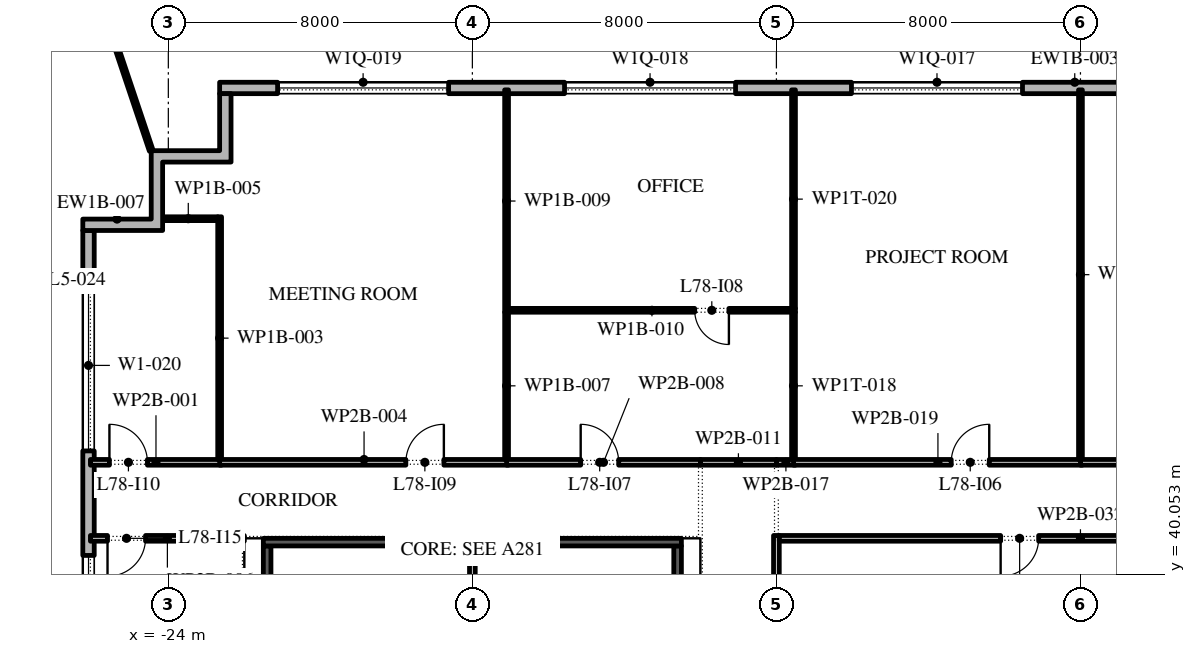
"""IFC4 building model, lengths in metres.
Left out: names, types, materials, properties, quantities, classifications, styles, units other than length and angle.
Written with IfcOpenShell. Run it as: python <this file> out.ifc"""

import sys

from ifc_helpers import new_model, si_unit, direction, frame, frame_2d, origin, place, context, subcontext, project, spatial, polyline, rectangle, outline, extrude, element, fill, save


model = new_model("IFC4")
c1 = context("Model", 3, precision=1e-05, world=origin(), true_north=direction((0.0, 1.0)))
c2 = subcontext(c1, "Body", "Model", "MODEL_VIEW")
j1 = project(units=[si_unit("LENGTHUNIT", "METRE"), si_unit("PLANEANGLEUNIT", "RADIAN")], contexts=[c1])
p1 = place(None, origin())
s1 = spatial("IfcSite", under=j1, at=p1, CompositionType="ELEMENT")
p2 = place(p1, origin())
s2 = spatial("IfcBuilding", under=s1, at=p2, CompositionType="ELEMENT")
p3 = place(p2, frame((0.0, 0.0, 355.2)))
s3 = spatial("IfcBuildingStorey", under=s2, at=p3, CompositionType="ELEMENT", Elevation=355.2)
p4 = place(p3, frame((22.35, 52.85, 0.0), z_axis=(0.0, 0.0, 1.0), x_axis=(-1.0, 0.0, 0.0)))
e1 = element("IfcWall", 1, at=p4, inside=s3, PredefinedType="STANDARD", context=c2, shape_type="SweptSolid", body=[
    extrude(rectangle(XDim=45.0, YDim=0.3, at=frame_2d((22.5, 0.0))), origin(), (0.0, 0.0, 1.0), 3.95),
])
p5 = place(p4, frame((1.375, 0.0, 0.45)))
e2 = element("IfcOpeningElement", 2, at=p5, cuts=e1, PredefinedType="OPENING", context=c2, shape_type="SweptSolid", body=[
    extrude(rectangle(XDim=4.5, YDim=2.45, at=frame_2d((2.25, 1.225))), frame((0.0, 0.16, 0.0), z_axis=(0.0, -1.0, 0.0), x_axis=(1.0, 0.0, 0.0)), (0.0, 0.0, 1.0), 0.32),
])
p6 = place(p4, frame((8.775, 0.0, 0.45)))
e3 = element("IfcOpeningElement", 3, at=p6, cuts=e1, PredefinedType="OPENING", context=c2, shape_type="SweptSolid", body=[
    extrude(rectangle(XDim=4.5, YDim=2.45, at=frame_2d((2.25, 1.225))), frame((0.0, 0.16, 0.0), z_axis=(0.0, -1.0, 0.0), x_axis=(1.0, 0.0, 0.0)), (0.0, 0.0, 1.0), 0.32),
])
p7 = place(p4, frame((17.375, 0.0, 0.0)))
e4 = element("IfcOpeningElement", 4, at=p7, cuts=e1, PredefinedType="OPENING", context=c2, shape_type="SweptSolid", body=[
    extrude(rectangle(XDim=2.4, YDim=2.9, at=frame_2d((1.2, 1.45))), frame((0.0, 0.16, 0.0), z_axis=(0.0, -1.0, 0.0), x_axis=(1.0, 0.0, 0.0)), (0.0, 0.0, 1.0), 0.32),
])
p8 = place(p4, frame((23.875, 0.0, 0.45)))
e5 = element("IfcOpeningElement", 5, at=p8, cuts=e1, PredefinedType="OPENING", context=c2, shape_type="SweptSolid", body=[
    extrude(rectangle(XDim=4.5, YDim=2.45, at=frame_2d((2.25, 1.225))), frame((0.0, 0.16, 0.0), z_axis=(0.0, -1.0, 0.0), x_axis=(1.0, 0.0, 0.0)), (0.0, 0.0, 1.0), 0.32),
])
p9 = place(p4, frame((31.425, 0.0, 0.45)))
e6 = element("IfcOpeningElement", 6, at=p9, cuts=e1, PredefinedType="OPENING", context=c2, shape_type="SweptSolid", body=[
    extrude(rectangle(XDim=4.5, YDim=2.45, at=frame_2d((2.25, 1.225))), frame((0.0, 0.16, 0.0), z_axis=(0.0, -1.0, 0.0), x_axis=(1.0, 0.0, 0.0)), (0.0, 0.0, 1.0), 0.32),
])
p10 = place(p4, frame((38.975, 0.0, 0.45)))
e7 = element("IfcOpeningElement", 7, at=p10, cuts=e1, PredefinedType="OPENING", context=c2, shape_type="SweptSolid", body=[
    extrude(rectangle(XDim=4.5, YDim=2.45, at=frame_2d((2.25, 1.225))), frame((0.0, 0.16, 0.0), z_axis=(0.0, -1.0, 0.0), x_axis=(1.0, 0.0, 0.0)), (0.0, 0.0, 1.0), 0.32),
])
p11 = place(p3, frame((-26.1, 49.1, 0.0), z_axis=(0.0, 0.0, 1.0), x_axis=(0.0, -1.0, 0.0)))
e8 = element("IfcWall", 8, at=p11, inside=s3, PredefinedType="STANDARD", context=c2, shape_type="SweptSolid", body=[
    extrude(rectangle(XDim=51.5, YDim=0.3, at=frame_2d((25.75, 0.0))), origin(), (0.0, 0.0, 1.0), 3.95),
])
p12 = place(p11, frame((1.3, 0.0, 0.45)))
e9 = element("IfcOpeningElement", 9, at=p12, cuts=e8, PredefinedType="OPENING", context=c2, shape_type="SweptSolid", body=[
    extrude(rectangle(XDim=4.5, YDim=3.05, at=frame_2d((2.25, 1.525))), frame((0.0, 0.16, 0.0), z_axis=(0.0, -1.0, 0.0), x_axis=(1.0, 0.0, 0.0)), (0.0, 0.0, 1.0), 0.32),
])
p13 = place(p11, frame((8.55, 0.0, 0.45)))
e10 = element("IfcOpeningElement", 10, at=p13, cuts=e8, PredefinedType="OPENING", context=c2, shape_type="SweptSolid", body=[
    extrude(rectangle(XDim=4.5, YDim=3.05, at=frame_2d((2.25, 1.525))), frame((0.0, 0.16, 0.0), z_axis=(0.0, -1.0, 0.0), x_axis=(1.0, 0.0, 0.0)), (0.0, 0.0, 1.0), 0.32),
])
p14 = place(p11, frame((17.0, 0.0, 0.0)))
e11 = element("IfcOpeningElement", 11, at=p14, cuts=e8, PredefinedType="OPENING", context=c2, shape_type="SweptSolid", body=[
    extrude(rectangle(XDim=2.4, YDim=3.45, at=frame_2d((1.2, 1.725))), frame((0.0, 0.16, 0.0), z_axis=(0.0, -1.0, 0.0), x_axis=(1.0, 0.0, 0.0)), (0.0, 0.0, 1.0), 0.32),
])
p15 = place(p11, frame((23.35, 0.0, 0.45)))
e12 = element("IfcOpeningElement", 12, at=p15, cuts=e8, PredefinedType="OPENING", context=c2, shape_type="SweptSolid", body=[
    extrude(rectangle(XDim=4.5, YDim=3.05, at=frame_2d((2.25, 1.525))), frame((0.0, 0.16, 0.0), z_axis=(0.0, -1.0, 0.0), x_axis=(1.0, 0.0, 0.0)), (0.0, 0.0, 1.0), 0.32),
])
p16 = place(p11, frame((30.75, 0.0, 0.45)))
e13 = element("IfcOpeningElement", 13, at=p16, cuts=e8, PredefinedType="OPENING", context=c2, shape_type="SweptSolid", body=[
    extrude(rectangle(XDim=4.5, YDim=3.05, at=frame_2d((2.25, 1.525))), frame((0.0, 0.16, 0.0), z_axis=(0.0, -1.0, 0.0), x_axis=(1.0, 0.0, 0.0)), (0.0, 0.0, 1.0), 0.32),
])
p17 = place(p11, frame((38.15, 0.0, 0.45)))
e14 = element("IfcOpeningElement", 14, at=p17, cuts=e8, PredefinedType="OPENING", context=c2, shape_type="SweptSolid", body=[
    extrude(rectangle(XDim=4.5, YDim=3.0, at=frame_2d((2.25, 1.5))), frame((0.0, 0.16, 0.0), z_axis=(0.0, -1.0, 0.0), x_axis=(1.0, 0.0, 0.0)), (0.0, 0.0, 1.0), 0.32),
])
p18 = place(p11, frame((46.6, 0.0, 0.0)))
e15 = element("IfcOpeningElement", 15, at=p18, cuts=e8, PredefinedType="OPENING", context=c2, shape_type="SweptSolid", body=[
    extrude(rectangle(XDim=2.4, YDim=3.45, at=frame_2d((1.2, 1.725))), frame((0.0, 0.16, 0.0), z_axis=(0.0, -1.0, 0.0), x_axis=(1.0, 0.0, 0.0)), (0.0, 0.0, 1.0), 0.32),
])
p19 = place(p3, origin())
e16 = element("IfcWall", 16, at=p19, inside=s3, PredefinedType="STANDARD", context=c2, shape_type="SweptSolid", body=[
    extrude(outline(polyline([(-24.45, 49.4), (-24.45, 51.2), (-22.65, 51.2), (-22.65, 52.7), (-22.35, 52.7), (-22.35, 50.9), (-24.15, 50.9), (-24.15, 49.1), (-26.25, 49.1), (-26.25, 49.4), (-24.45, 49.4)])), origin(), (0.0, 0.0, 1.0), 3.95),
])
p20 = place(p3, frame((-24.45, 51.2, -0.05), z_axis=(0.0, 0.0, 1.0), x_axis=(-0.318388488285, 0.947960321178, 0.0)))
e17 = element("IfcWall", 17, at=p20, inside=s3, PredefinedType="STANDARD", context=c2, shape_type="SweptSolid", body=[
    extrude(rectangle(XDim=6.811, YDim=0.1, at=frame_2d((3.405, 0.0))), origin(), (0.0, 0.0, 1.0), 4.0),
])
p21 = place(p3, frame((-21.4, 25.75, 0.0), z_axis=(0.0, 0.0, 1.0), x_axis=(0.0, 1.0, 0.0)))
e18 = element("IfcWall", 18, at=p21, inside=s3, PredefinedType="SHEAR", context=c2, shape_type="SweptSolid", body=[
    extrude(rectangle(XDim=15.05, YDim=0.2, at=frame_2d((7.525, 0.0))), origin(), (0.0, 0.0, 1.0), 3.95),
])
p22 = place(p21, frame((7.075, 0.0, 0.0)))
e19 = element("IfcOpeningElement", 19, at=p22, cuts=e18, PredefinedType="OPENING", context=c2, shape_type="SweptSolid", body=[
    extrude(rectangle(XDim=0.9, YDim=2.1, at=frame_2d((0.45, 1.05))), frame((0.0, 0.11, 0.0), z_axis=(0.0, -1.0, 0.0), x_axis=(1.0, 0.0, 0.0)), (0.0, 0.0, 1.0), 0.22),
])
p23 = place(p3, frame((-10.6, 25.75, 0.0), z_axis=(0.0, 0.0, 1.0), x_axis=(0.0, 1.0, 0.0)))
e20 = element("IfcWall", 20, at=p23, inside=s3, PredefinedType="SHEAR", context=c2, shape_type="SweptSolid", body=[
    extrude(rectangle(XDim=15.05, YDim=0.2, at=frame_2d((7.525, 0.0))), origin(), (0.0, 0.0, 1.0), 3.95),
])
p24 = place(p23, frame((3.288, 0.0, 0.0)))
e21 = element("IfcOpeningElement", 21, at=p24, cuts=e20, PredefinedType="OPENING", context=c2, shape_type="SweptSolid", body=[
    extrude(rectangle(XDim=0.9, YDim=2.1, at=frame_2d((0.45, 1.05))), frame((0.0, 0.11, 0.0), z_axis=(0.0, -1.0, 0.0), x_axis=(1.0, 0.0, 0.0)), (0.0, 0.0, 1.0), 0.22),
])
p25 = place(p23, frame((10.887, 0.0, 0.0)))
e22 = element("IfcOpeningElement", 22, at=p25, cuts=e20, PredefinedType="OPENING", context=c2, shape_type="SweptSolid", body=[
    extrude(rectangle(XDim=0.9, YDim=2.1, at=frame_2d((0.45, 1.05))), frame((0.0, 0.11, 0.0), z_axis=(0.0, -1.0, 0.0), x_axis=(1.0, 0.0, 0.0)), (0.0, 0.0, 1.0), 0.22),
])
p26 = place(p3, frame((-21.5, 40.9, 0.0), z_axis=(0.0, 0.0, 1.0), x_axis=(1.0, 0.0, 0.0)))
e23 = element("IfcWall", 23, at=p26, inside=s3, PredefinedType="SHEAR", context=c2, shape_type="SweptSolid", body=[
    extrude(rectangle(XDim=11.0, YDim=0.2, at=frame_2d((5.5, 0.0))), origin(), (0.0, 0.0, 1.0), 3.95),
])
p27 = place(p3, frame((-16.0, 25.75, 0.0), z_axis=(0.0, 0.0, 1.0), x_axis=(0.0, 1.0, 0.0)))
e24 = element("IfcWall", 24, at=p27, inside=s3, PredefinedType="PARTITIONING", context=c2, shape_type="SweptSolid", body=[
    extrude(rectangle(XDim=15.05, YDim=0.15, at=frame_2d((7.525, 0.0))), origin(), (0.0, 0.0, 1.0), 3.95),
])
p28 = place(p3, frame((-26.05, 43.0, 0.0), z_axis=(0.0, 0.0, 1.0), x_axis=(1.0, 0.0, 0.0)))
e25 = element("IfcWall", 25, at=p28, inside=s3, PredefinedType="PARTITIONING", context=c2, shape_type="SweptSolid", body=[
    extrude(rectangle(XDim=3.45, YDim=0.15, at=frame_2d((1.725, 0.0))), origin(), (0.0, 0.0, 1.0), 3.95),
])
p29 = place(p28, frame((0.5, 0.0, 0.0)))
e26 = element("IfcOpeningElement", 26, at=p29, cuts=e25, PredefinedType="OPENING", context=c2, shape_type="SweptSolid", body=[
    extrude(rectangle(XDim=1.0, YDim=2.1, at=frame_2d((0.5, 1.05))), frame((0.0, 0.085, 0.0), z_axis=(0.0, -1.0, 0.0), x_axis=(1.0, 0.0, 0.0)), (0.0, 0.0, 1.0), 0.17),
])
p30 = place(p3, frame((-22.65, 43.075, 0.0), z_axis=(0.0, 0.0, 1.0), x_axis=(0.0, 1.0, 0.0)))
e27 = element("IfcWall", 27, at=p30, inside=s3, PredefinedType="PARTITIONING", context=c2, shape_type="SweptSolid", body=[
    extrude(rectangle(XDim=6.385, YDim=0.1, at=frame_2d((3.192, 0.0))), origin(), (0.0, 0.0, 1.0), 3.95),
])
p31 = place(p3, frame((-22.65, 43.0, 0.0), z_axis=(0.0, 0.0, 1.0), x_axis=(1.0, 0.0, 0.0)))
e28 = element("IfcWall", 28, at=p31, inside=s3, PredefinedType="PARTITIONING", context=c2, shape_type="SweptSolid", body=[
    extrude(rectangle(XDim=7.6, YDim=0.15, at=frame_2d((3.8, 0.0))), origin(), (0.0, 0.0, 1.0), 3.95),
])
p32 = place(p31, frame((4.9, 0.0, 0.0)))
e29 = element("IfcOpeningElement", 29, at=p32, cuts=e28, PredefinedType="OPENING", context=c2, shape_type="SweptSolid", body=[
    extrude(rectangle(XDim=1.0, YDim=2.1, at=frame_2d((0.5, 1.05))), frame((0.0, 0.085, 0.0), z_axis=(0.0, -1.0, 0.0), x_axis=(1.0, 0.0, 0.0)), (0.0, 0.0, 1.0), 0.17),
])
p33 = place(p3, frame((-22.7, 49.41, 0.0), z_axis=(0.0, 0.0, 1.0), x_axis=(-1.0, 0.0, 0.0)))
e30 = element("IfcWall", 30, at=p33, inside=s3, PredefinedType="PARTITIONING", context=c2, shape_type="SweptSolid", body=[
    extrude(rectangle(XDim=1.55, YDim=0.1, at=frame_2d((0.775, 0.0))), origin(), (0.0, 0.0, 1.0), 3.95),
])
p34 = place(p3, frame((-22.0, 41.0, 0.0), z_axis=(0.0, 0.0, 1.0), x_axis=(-1.0, 0.0, 0.0)))
e31 = element("IfcWall", 31, at=p34, inside=s3, PredefinedType="PARTITIONING", context=c2, shape_type="SweptSolid", body=[
    extrude(rectangle(XDim=4.05, YDim=0.15, at=frame_2d((2.025, 0.0))), origin(), (0.0, 0.0, 1.0), 3.95),
])
p35 = place(p34, frame((2.6, 0.0, 0.0)))
e32 = element("IfcOpeningElement", 32, at=p35, cuts=e31, PredefinedType="OPENING", context=c2, shape_type="SweptSolid", body=[
    extrude(rectangle(XDim=1.0, YDim=2.1, at=frame_2d((0.5, 1.05))), frame((0.0, 0.085, 0.0), z_axis=(0.0, -1.0, 0.0), x_axis=(1.0, 0.0, 0.0)), (0.0, 0.0, 1.0), 0.17),
])
p36 = place(p3, frame((-15.1, 43.075, 0.0), z_axis=(0.0, 0.0, 1.0), x_axis=(0.0, 1.0, 0.0)))
e33 = element("IfcWall", 33, at=p36, inside=s3, PredefinedType="PARTITIONING", context=c2, shape_type="SweptSolid", body=[
    extrude(rectangle(XDim=3.875, YDim=0.1, at=frame_2d((1.938, 0.0))), origin(), (0.0, 0.0, 1.0), 3.95),
])
p37 = place(p3, frame((-15.1, 43.0, 0.0), z_axis=(0.0, 0.0, 1.0), x_axis=(1.0, 0.0, 0.0)))
e34 = element("IfcWall", 34, at=p37, inside=s3, PredefinedType="PARTITIONING", context=c2, shape_type="SweptSolid", body=[
    extrude(rectangle(XDim=5.1, YDim=0.15, at=frame_2d((2.55, 0.0))), origin(), (0.0, 0.0, 1.0), 3.95),
])
p38 = place(p37, frame((1.95, 0.0, 0.0)))
e35 = element("IfcOpeningElement", 35, at=p38, cuts=e34, PredefinedType="OPENING", context=c2, shape_type="SweptSolid", body=[
    extrude(rectangle(XDim=1.0, YDim=2.1, at=frame_2d((0.5, 1.05))), frame((0.0, 0.085, 0.0), z_axis=(0.0, -1.0, 0.0), x_axis=(1.0, 0.0, 0.0)), (0.0, 0.0, 1.0), 0.17),
])
p39 = place(p3, frame((-15.1, 46.95, 0.0), z_axis=(0.0, 0.0, 1.0), x_axis=(0.0, 1.0, 0.0)))
e36 = element("IfcWall", 36, at=p39, inside=s3, PredefinedType="PARTITIONING", context=c2, shape_type="SweptSolid", body=[
    extrude(rectangle(XDim=5.85, YDim=0.1, at=frame_2d((2.925, 0.0))), origin(), (0.0, 0.0, 1.0), 3.95),
])
p40 = place(p3, frame((-15.05, 47.0, 0.0), z_axis=(0.0, 0.0, 1.0), x_axis=(1.0, 0.0, 0.0)))
e37 = element("IfcWall", 37, at=p40, inside=s3, PredefinedType="PARTITIONING", context=c2, shape_type="SweptSolid", body=[
    extrude(rectangle(XDim=7.55, YDim=0.1, at=frame_2d((3.775, 0.0))), origin(), (0.0, 0.0, 1.0), 3.95),
])
p41 = place(p40, frame((4.9, 0.0, 0.0)))
e38 = element("IfcOpeningElement", 38, at=p41, cuts=e37, PredefinedType="OPENING", context=c2, shape_type="SweptSolid", body=[
    extrude(rectangle(XDim=0.9, YDim=2.1, at=frame_2d((0.45, 1.05))), frame((0.0, 0.06, 0.0), z_axis=(0.0, -1.0, 0.0), x_axis=(1.0, 0.0, 0.0)), (0.0, 0.0, 1.0), 0.12),
])
p42 = place(p3, frame((-10.0, 43.0, 0.0), z_axis=(0.0, 0.0, 1.0), x_axis=(1.0, 0.0, 0.0)))
e39 = element("IfcWall", 39, at=p42, inside=s3, PredefinedType="PARTITIONING", context=c2, shape_type="SweptSolid", body=[
    extrude(rectangle(XDim=2.0, YDim=0.15, at=frame_2d((1.0, 0.0))), origin(), (0.0, 0.0, 1.0), 3.95),
])
p43 = place(p3, frame((-8.0, 41.075, 0.0), z_axis=(0.0, 0.0, 1.0), x_axis=(0.0, -1.0, 0.0)))
e40 = element("IfcWall", 40, at=p43, inside=s3, PredefinedType="PARTITIONING", context=c2, shape_type="SweptSolid", body=[
    extrude(rectangle(XDim=6.475, YDim=0.15, at=frame_2d((3.237, 0.0))), origin(), (0.0, 0.0, 1.0), 3.95),
])
p44 = place(p3, frame((-8.0, 43.0, 0.0), z_axis=(0.0, 0.0, 1.0), x_axis=(1.0, 0.0, 0.0)))
e41 = element("IfcWall", 41, at=p44, inside=s3, PredefinedType="PARTITIONING", context=c2, shape_type="SweptSolid", body=[
    extrude(rectangle(XDim=0.5, YDim=0.15, at=frame_2d((0.25, 0.0))), origin(), (0.0, 0.0, 1.0), 3.95),
])
p45 = place(p3, frame((-7.55, 43.075, 0.0), z_axis=(0.0, 0.0, 1.0), x_axis=(0.0, 1.0, 0.0)))
e42 = element("IfcWall", 42, at=p45, inside=s3, PredefinedType="PARTITIONING", context=c2, shape_type="SweptSolid", body=[
    extrude(rectangle(XDim=3.875, YDim=0.1, at=frame_2d((1.938, 0.0))), origin(), (0.0, 0.0, 1.0), 3.031),
])
p46 = place(p3, frame((-7.55, 43.0, 0.0), z_axis=(0.0, 0.0, 1.0), x_axis=(1.0, 0.0, 0.0)))
e43 = element("IfcWall", 43, at=p46, inside=s3, PredefinedType="PARTITIONING", context=c2, shape_type="SweptSolid", body=[
    extrude(rectangle(XDim=7.6, YDim=0.15, at=frame_2d((3.8, 0.0))), origin(), (0.0, 0.0, 1.0), 3.95),
])
p47 = place(p46, frame((4.15, 0.0, 0.0)))
e44 = element("IfcOpeningElement", 44, at=p47, cuts=e43, PredefinedType="OPENING", context=c2, shape_type="SweptSolid", body=[
    extrude(rectangle(XDim=1.0, YDim=2.1, at=frame_2d((0.5, 1.05))), frame((0.0, 0.085, 0.0), z_axis=(0.0, -1.0, 0.0), x_axis=(1.0, 0.0, 0.0)), (0.0, 0.0, 1.0), 0.17),
])
p48 = place(p3, frame((-7.55, 47.05, 0.0), z_axis=(0.0, 0.0, 1.0), x_axis=(0.0, 1.0, 0.0)))
e45 = element("IfcWall", 45, at=p48, inside=s3, PredefinedType="PARTITIONING", context=c2, shape_type="SweptSolid", body=[
    extrude(rectangle(XDim=5.75, YDim=0.1, at=frame_2d((2.875, 0.0))), origin(), (0.0, 0.0, 1.0), 3.031),
])
p49 = place(p3, frame((0.0, 43.075, 0.0), z_axis=(0.0, 0.0, 1.0), x_axis=(0.0, 1.0, 0.0)))
e46 = element("IfcWall", 46, at=p49, inside=s3, PredefinedType="PARTITIONING", context=c2, shape_type="SweptSolid", body=[
    extrude(rectangle(XDim=9.725, YDim=0.1, at=frame_2d((4.863, 0.0))), origin(), (0.0, 0.0, 1.0), 3.95),
])
p50 = place(p3, frame((0.0, 43.0, 0.0), z_axis=(0.0, 0.0, 1.0), x_axis=(1.0, 0.0, 0.0)))
e47 = element("IfcWall", 47, at=p50, inside=s3, PredefinedType="PARTITIONING", context=c2, shape_type="SweptSolid", body=[
    extrude(rectangle(XDim=7.6, YDim=0.15, at=frame_2d((3.8, 0.0))), origin(), (0.0, 0.0, 1.0), 3.95),
])
p51 = place(p50, frame((4.9, 0.0, 0.0)))
e48 = element("IfcOpeningElement", 48, at=p51, cuts=e47, PredefinedType="OPENING", context=c2, shape_type="SweptSolid", body=[
    extrude(rectangle(XDim=1.0, YDim=2.1, at=frame_2d((0.5, 1.05))), frame((0.0, 0.085, 0.0), z_axis=(0.0, -1.0, 0.0), x_axis=(1.0, 0.0, 0.0)), (0.0, 0.0, 1.0), 0.17),
])
p52 = place(p3, frame((7.925, 41.0, 0.0), z_axis=(0.0, 0.0, 1.0), x_axis=(-1.0, 0.0, 0.0)))
e49 = element("IfcWall", 49, at=p52, inside=s3, PredefinedType="PARTITIONING", context=c2, shape_type="SweptSolid", body=[
    extrude(rectangle(XDim=15.85, YDim=0.15, at=frame_2d((7.925, 0.0))), origin(), (0.0, 0.0, 1.0), 3.95),
])
p53 = place(p52, frame((9.025, 0.0, 0.0)))
e50 = element("IfcOpeningElement", 50, at=p53, cuts=e49, PredefinedType="OPENING", context=c2, shape_type="SweptSolid", body=[
    extrude(rectangle(XDim=1.0, YDim=2.1, at=frame_2d((0.5, 1.05))), frame((0.0, 0.085, 0.0), z_axis=(0.0, -1.0, 0.0), x_axis=(1.0, 0.0, 0.0)), (0.0, 0.0, 1.0), 0.17),
])
p54 = place(p8, origin())
e51 = element("IfcWindow", 51, at=p54, inside=s3, PartitioningType="DOUBLE_PANEL_VERTICAL", PredefinedType="WINDOW", context=c2, shape_type="SweptSolid", body=[
    extrude(rectangle(XDim=4.5, YDim=2.45, at=frame_2d((2.25, 1.225))), frame((0.0, 0.03, 0.0), z_axis=(0.0, -1.0, 0.0), x_axis=(1.0, 0.0, 0.0)), (0.0, 0.0, 1.0), 0.06),
])
fill(e5, e51)
p55 = place(p9, origin())
e52 = element("IfcWindow", 52, at=p55, inside=s3, PartitioningType="DOUBLE_PANEL_VERTICAL", PredefinedType="WINDOW", context=c2, shape_type="SweptSolid", body=[
    extrude(rectangle(XDim=4.5, YDim=2.45, at=frame_2d((2.25, 1.225))), frame((0.0, 0.03, 0.0), z_axis=(0.0, -1.0, 0.0), x_axis=(1.0, 0.0, 0.0)), (0.0, 0.0, 1.0), 0.06),
])
fill(e6, e52)
p56 = place(p10, origin())
e53 = element("IfcWindow", 53, at=p56, inside=s3, PartitioningType="DOUBLE_PANEL_VERTICAL", PredefinedType="WINDOW", context=c2, shape_type="SweptSolid", body=[
    extrude(rectangle(XDim=4.5, YDim=2.45, at=frame_2d((2.25, 1.225))), frame((0.0, 0.03, 0.0), z_axis=(0.0, -1.0, 0.0), x_axis=(1.0, 0.0, 0.0)), (0.0, 0.0, 1.0), 0.06),
])
fill(e7, e53)
p57 = place(p12, origin())
e54 = element("IfcWindow", 54, at=p57, inside=s3, PartitioningType="DOUBLE_PANEL_VERTICAL", PredefinedType="WINDOW", context=c2, shape_type="SweptSolid", body=[
    extrude(rectangle(XDim=4.5, YDim=3.05, at=frame_2d((2.25, 1.525))), frame((0.0, 0.03, 0.0), z_axis=(0.0, -1.0, 0.0), x_axis=(1.0, 0.0, 0.0)), (0.0, 0.0, 1.0), 0.06),
])
fill(e9, e54)
p58 = place(p13, origin())
e55 = element("IfcWindow", 55, at=p58, inside=s3, PartitioningType="DOUBLE_PANEL_VERTICAL", PredefinedType="WINDOW", context=c2, shape_type="SweptSolid", body=[
    extrude(rectangle(XDim=4.5, YDim=3.05, at=frame_2d((2.25, 1.525))), frame((0.0, 0.03, 0.0), z_axis=(0.0, -1.0, 0.0), x_axis=(1.0, 0.0, 0.0)), (0.0, 0.0, 1.0), 0.06),
])
fill(e10, e55)
p59 = place(p47, origin())
e56 = element("IfcDoor", 56, at=p59, inside=s3, OperationType="SINGLE_SWING_LEFT", PredefinedType="DOOR", context=c2, shape_type="SweptSolid", body=[
    extrude(rectangle(XDim=1.0, YDim=2.1, at=frame_2d((0.5, 1.05))), frame((0.0, 0.025, 0.0), z_axis=(0.0, -1.0, 0.0), x_axis=(1.0, 0.0, 0.0)), (0.0, 0.0, 1.0), 0.05),
])
fill(e44, e56)
p60 = place(p38, origin())
e57 = element("IfcDoor", 57, at=p60, inside=s3, OperationType="SINGLE_SWING_RIGHT", PredefinedType="DOOR", context=c2, shape_type="SweptSolid", body=[
    extrude(rectangle(XDim=1.0, YDim=2.1, at=frame_2d((0.5, 1.05))), frame((0.0, 0.025, 0.0), z_axis=(0.0, -1.0, 0.0), x_axis=(1.0, 0.0, 0.0)), (0.0, 0.0, 1.0), 0.05),
])
fill(e35, e57)
p61 = place(p41, frame((0.9, 0.0, 0.0), z_axis=(0.0, 0.0, 1.0), x_axis=(-1.0, 0.0, 0.0)))
e58 = element("IfcDoor", 58, at=p61, inside=s3, OperationType="SINGLE_SWING_RIGHT", PredefinedType="DOOR", context=c2, shape_type="SweptSolid", body=[
    extrude(rectangle(XDim=0.9, YDim=2.1, at=frame_2d((0.45, 1.05))), frame((0.0, 0.025, 0.0), z_axis=(0.0, -1.0, 0.0), x_axis=(1.0, 0.0, 0.0)), (0.0, 0.0, 1.0), 0.05),
])
fill(e38, e58)
p62 = place(p32, origin())
e59 = element("IfcDoor", 59, at=p62, inside=s3, OperationType="SINGLE_SWING_LEFT", PredefinedType="DOOR", context=c2, shape_type="SweptSolid", body=[
    extrude(rectangle(XDim=1.0, YDim=2.1, at=frame_2d((0.5, 1.05))), frame((0.0, 0.025, 0.0), z_axis=(0.0, -1.0, 0.0), x_axis=(1.0, 0.0, 0.0)), (0.0, 0.0, 1.0), 0.05),
])
fill(e29, e59)
p63 = place(p29, origin())
e60 = element("IfcDoor", 60, at=p63, inside=s3, OperationType="SINGLE_SWING_RIGHT", PredefinedType="DOOR", context=c2, shape_type="SweptSolid", body=[
    extrude(rectangle(XDim=1.0, YDim=2.1, at=frame_2d((0.5, 1.05))), frame((0.0, 0.025, 0.0), z_axis=(0.0, -1.0, 0.0), x_axis=(1.0, 0.0, 0.0)), (0.0, 0.0, 1.0), 0.05),
])
fill(e26, e60)
p64 = place(p53, origin())
e61 = element("IfcDoor", 61, at=p64, inside=s3, OperationType="SINGLE_SWING_LEFT", PredefinedType="DOOR", context=c2, shape_type="SweptSolid", body=[
    extrude(rectangle(XDim=1.0, YDim=2.1, at=frame_2d((0.5, 1.05))), frame((0.0, 0.025, 0.0), z_axis=(0.0, -1.0, 0.0), x_axis=(1.0, 0.0, 0.0)), (0.0, 0.0, 1.0), 0.05),
])
fill(e50, e61)
p65 = place(p35, origin())
e62 = element("IfcDoor", 62, at=p65, inside=s3, OperationType="SINGLE_SWING_LEFT", PredefinedType="DOOR", context=c2, shape_type="SweptSolid", body=[
    extrude(rectangle(XDim=1.0, YDim=2.1, at=frame_2d((0.5, 1.05))), frame((0.0, 0.025, 0.0), z_axis=(0.0, -1.0, 0.0), x_axis=(1.0, 0.0, 0.0)), (0.0, 0.0, 1.0), 0.05),
])
fill(e32, e62)
save(model, sys.argv[1])
